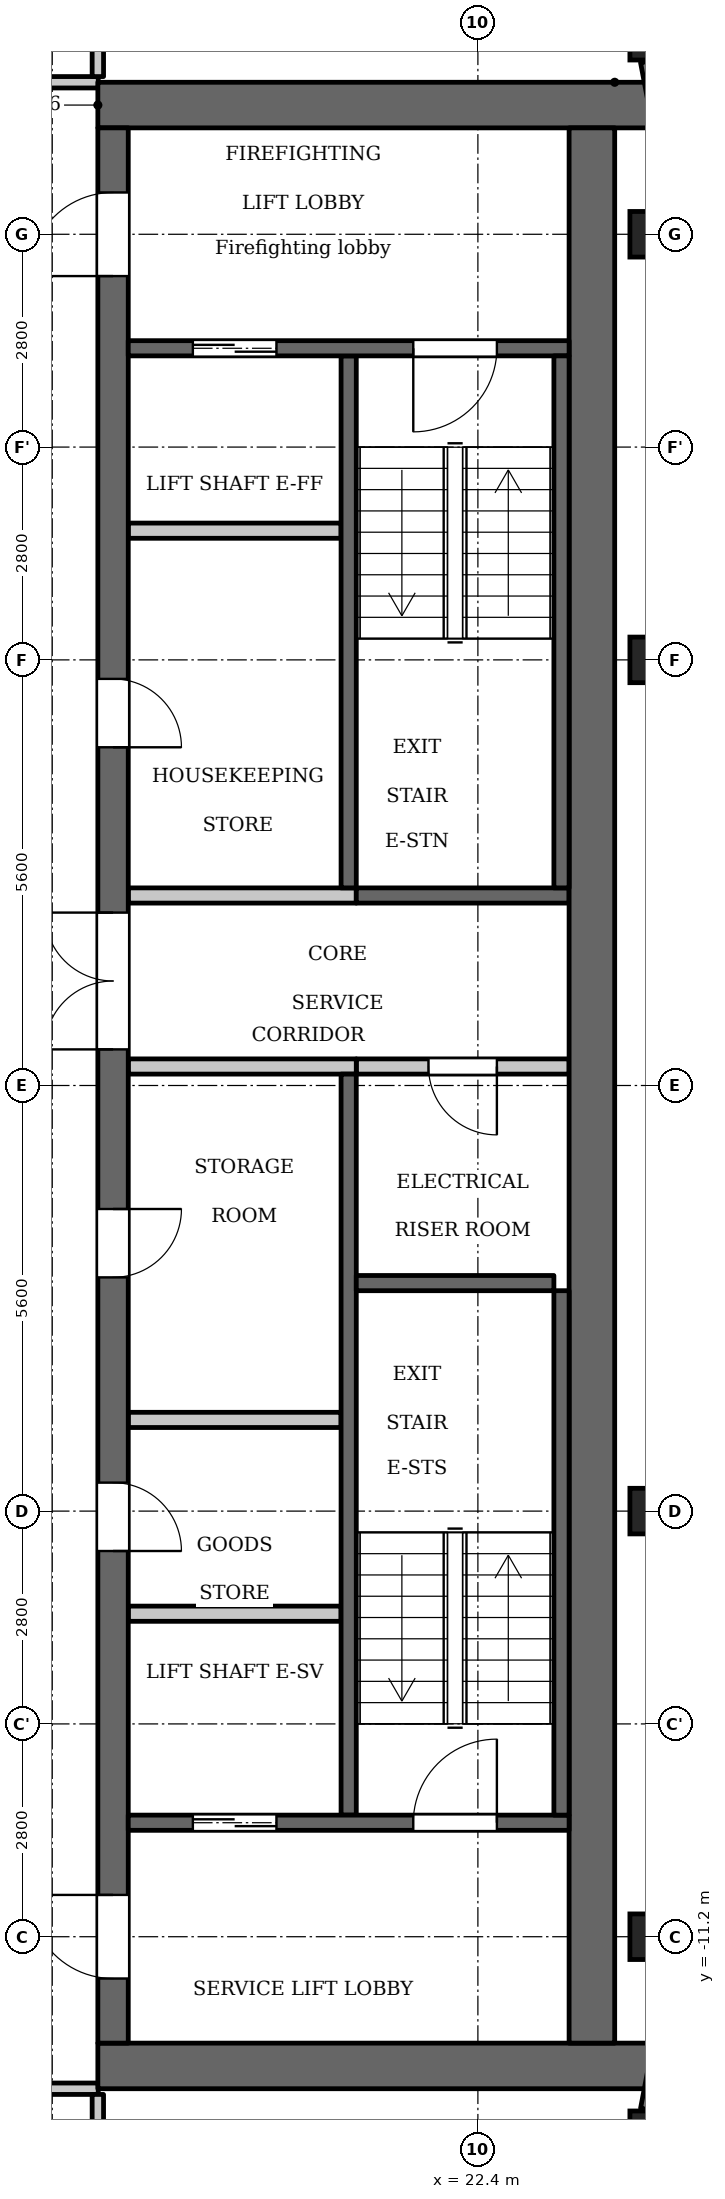
"""IFC4 building model, lengths in metres.
Left out: names, types, materials, properties, quantities, classifications, styles, units other than length and angle.
Written with IfcOpenShell. Run it as: python <this file> out.ifc"""

import sys

from ifc_helpers import new_model, si_unit, direction, frame, frame_2d, origin, origin_2d, place, context, subcontext, project, spatial, rectangle, extrude, element, fill, save


model = new_model("IFC4")
c1 = context("Model", 3, precision=1e-05, world=origin(), true_north=direction((0.0, 1.0)))
c2 = subcontext(c1, "Body", "Model", "MODEL_VIEW")
j1 = project(units=[si_unit("LENGTHUNIT", "METRE"), si_unit("PLANEANGLEUNIT", "RADIAN")], contexts=[c1])
p1 = place(None, origin())
s1 = spatial("IfcSite", under=j1, at=p1, CompositionType="ELEMENT")
p2 = place(p1, origin())
s2 = spatial("IfcBuilding", under=s1, at=p2, CompositionType="ELEMENT")
p3 = place(p2, frame((0.0, 0.0, 310.4)))
s3 = spatial("IfcBuildingStorey", under=s2, at=p3, CompositionType="ELEMENT", Elevation=310.4)
for number, where, z_axis, x_axis in (
    (1, (24.7, -13.793, 0.0), (0.0, 0.0, 1.0), (1.0, 0.0, 0.0)),
    (2, (24.7, -11.2, 0.0), (0.0, 0.0, 1.0), (1.0, 0.0, 0.0)),
    (3, (24.7, -5.6, 0.0), (0.0, 0.0, 1.0), (1.0, 0.0, 0.0)),
    (4, (24.7, 5.6, 0.0), (0.0, 0.0, 1.0), (1.0, 0.0, 0.0)),
    (5, (24.7, 11.2, 0.0), (0.0, 0.0, 1.0), (1.0, 0.0, 0.0)),
    (6, (24.7, 13.793, 0.0), (0.0, 0.0, 1.0), (1.0, 0.0, 0.0)),
):
    element("IfcColumn", number, at=place(p3, frame(where, z_axis=z_axis, x_axis=x_axis)), inside=s3, PredefinedType="COLUMN", context=c2, shape_type="SweptSolid", body=[
        extrude(rectangle(XDim=0.6, YDim=0.6, at=origin_2d()), origin(), (0.0, 0.0, 1.0), 3.5),
    ])
for number, where, z_axis, x_axis in (
    (7, (24.688, -13.485, 0.0), (0.0, 0.0, 1.0), (0.187, 0.982, 0.0)),
    (8, (25.052, 11.573, 0.0), (0.0, 0.0, 1.0), (-0.187, 0.982, 0.0)),
):
    element("IfcWall", number, at=place(p3, frame(where, z_axis=z_axis, x_axis=x_axis)), inside=s3, PredefinedType="SOLIDWALL", context=c2, shape_type="SweptSolid", body=[
        extrude(rectangle(XDim=1.947, YDim=0.3, at=frame_2d((0.973, 0.0))), origin(), (0.0, 0.0, 1.0), 2.2),
    ])
p4 = place(p3, frame((20.7, 2.6, 0.0), z_axis=(0.0, 0.0, 1.0), x_axis=(0.0, 1.0, 0.0)))
e9 = element("IfcWall", 9, at=p4, inside=s3, PredefinedType="SHEAR", context=c2, shape_type="SweptSolid", body=[
    extrude(rectangle(XDim=7.0, YDim=0.2, at=frame_2d((3.5, 0.0))), origin(), (0.0, 0.0, 1.0), 2.8),
])
p5 = place(p3, frame((20.7, -9.6, 0.0), z_axis=(0.0, 0.0, 1.0), x_axis=(0.0, 1.0, 0.0)))
e10 = element("IfcWall", 10, at=p5, inside=s3, PredefinedType="SHEAR", context=c2, shape_type="SweptSolid", body=[
    extrude(rectangle(XDim=9.75, YDim=0.2, at=frame_2d((4.875, 0.0))), origin(), (0.0, 0.0, 1.0), 2.8),
])
p6 = place(p3, frame((20.8, 2.5, 0.0), z_axis=(0.0, 0.0, 1.0), x_axis=(1.0, 0.0, 0.0)))
e11 = element("IfcWall", 11, at=p6, inside=s3, PredefinedType="SHEAR", context=c2, shape_type="SweptSolid", body=[
    extrude(rectangle(XDim=2.8, YDim=0.2, at=frame_2d((1.4, 0.0))), origin(), (0.0, 0.0, 1.0), 2.8),
])
p7 = place(p3, frame((20.8, 0.25, 0.0), z_axis=(0.0, 0.0, 1.0), x_axis=(1.0, 0.0, 0.0)))
e12 = element("IfcWall", 12, at=p7, inside=s3, PredefinedType="PARTITIONING", context=c2, shape_type="SweptSolid", body=[
    extrude(rectangle(XDim=2.8, YDim=0.2, at=frame_2d((1.4, 0.0))), origin(), (0.0, 0.0, 1.0), 2.8),
])
p8 = place(p7, frame((0.95, 0.0, 0.0)))
e13 = element("IfcOpeningElement", 13, at=p8, cuts=e12, PredefinedType="OPENING", context=c2, shape_type="SweptSolid", body=[
    extrude(rectangle(XDim=0.9, YDim=2.1, at=frame_2d((0.45, 1.05))), frame((0.0, 0.11, 0.0), z_axis=(0.0, -1.0, 0.0), x_axis=(1.0, 0.0, 0.0)), (0.0, 0.0, 1.0), 0.22),
])
for number, where, z_axis, x_axis in (
    (14, (17.4, 12.9, 0.0), (0.0, 0.0, 1.0), (1.0, 0.0, 0.0)),
    (15, (17.4, -12.9, 0.0), (0.0, 0.0, 1.0), (1.0, 0.0, 0.0)),
):
    element("IfcWall", number, at=place(p3, frame(where, z_axis=z_axis, x_axis=x_axis)), inside=s3, PredefinedType="SHEAR", context=c2, shape_type="SweptSolid", body=[
        extrude(rectangle(XDim=7.6, YDim=0.6, at=frame_2d((3.8, 0.0))), origin(), (0.0, 0.0, 1.0), 2.8),
    ])
p9 = place(p3, frame((17.8, -4.4, 0.0), z_axis=(0.0, 0.0, 1.0), x_axis=(1.0, 0.0, 0.0)))
e16 = element("IfcWall", 16, at=p9, inside=s3, PredefinedType="PARTITIONING", context=c2, shape_type="SweptSolid", body=[
    extrude(rectangle(XDim=2.8, YDim=0.2, at=frame_2d((1.4, 0.0))), origin(), (0.0, 0.0, 1.0), 2.8),
])
p10 = place(p3, frame((17.6, -12.6, 0.0), z_axis=(0.0, 0.0, 1.0), x_axis=(0.0, 1.0, 0.0)))
e17 = element("IfcWall", 17, at=p10, inside=s3, PredefinedType="SHEAR", context=c2, shape_type="SweptSolid", body=[
    extrude(rectangle(XDim=25.2, YDim=0.4, at=frame_2d((12.6, 0.0))), origin(), (0.0, 0.0, 1.0), 2.8),
])
p11 = place(p10, frame((6.475, 0.0, 0.0)))
e18 = element("IfcOpeningElement", 18, at=p11, cuts=e17, PredefinedType="OPENING", context=c2, shape_type="SweptSolid", body=[
    extrude(rectangle(XDim=0.9, YDim=2.1, at=frame_2d((0.45, 1.05))), frame((0.0, 0.21, 0.0), z_axis=(0.0, -1.0, 0.0), x_axis=(1.0, 0.0, 0.0)), (0.0, 0.0, 1.0), 0.42),
])
p12 = place(p10, frame((10.075, 0.0, 0.0)))
e19 = element("IfcOpeningElement", 19, at=p12, cuts=e17, PredefinedType="OPENING", context=c2, shape_type="SweptSolid", body=[
    extrude(rectangle(XDim=0.9, YDim=2.1, at=frame_2d((0.45, 1.05))), frame((0.0, 0.21, 0.0), z_axis=(0.0, -1.0, 0.0), x_axis=(1.0, 0.0, 0.0)), (0.0, 0.0, 1.0), 0.42),
])
p13 = place(p10, frame((17.05, 0.0, 0.0)))
e20 = element("IfcOpeningElement", 20, at=p13, cuts=e17, PredefinedType="OPENING", context=c2, shape_type="SweptSolid", body=[
    extrude(rectangle(XDim=0.9, YDim=2.1, at=frame_2d((0.45, 1.05))), frame((0.0, 0.21, 0.0), z_axis=(0.0, -1.0, 0.0), x_axis=(1.0, 0.0, 0.0)), (0.0, 0.0, 1.0), 0.42),
])
p14 = place(p10, frame((23.25, 0.0, 0.0)))
e21 = element("IfcOpeningElement", 21, at=p14, cuts=e17, PredefinedType="OPENING", context=c2, shape_type="SweptSolid", body=[
    extrude(rectangle(XDim=1.1, YDim=2.1, at=frame_2d((0.55, 1.05))), frame((0.0, 0.21, 0.0), z_axis=(0.0, -1.0, 0.0), x_axis=(1.0, 0.0, 0.0)), (0.0, 0.0, 1.0), 0.42),
])
p15 = place(p10, frame((0.85, 0.0, 0.0)))
e22 = element("IfcOpeningElement", 22, at=p15, cuts=e17, PredefinedType="OPENING", context=c2, shape_type="SweptSolid", body=[
    extrude(rectangle(XDim=1.1, YDim=2.1, at=frame_2d((0.55, 1.05))), frame((0.0, 0.21, 0.0), z_axis=(0.0, -1.0, 0.0), x_axis=(1.0, 0.0, 0.0)), (0.0, 0.0, 1.0), 0.42),
])
p16 = place(p10, frame((13.075, 0.0, 0.0)))
e23 = element("IfcOpeningElement", 23, at=p16, cuts=e17, PredefinedType="OPENING", context=c2, shape_type="SweptSolid", body=[
    extrude(rectangle(XDim=1.8, YDim=2.1, at=frame_2d((0.9, 1.05))), frame((0.0, 0.21, 0.0), z_axis=(0.0, -1.0, 0.0), x_axis=(1.0, 0.0, 0.0)), (0.0, 0.0, 1.0), 0.42),
])
p17 = place(p3, frame((23.9, -12.6, 0.0), z_axis=(0.0, 0.0, 1.0), x_axis=(0.0, 1.0, 0.0)))
e24 = element("IfcWall", 24, at=p17, inside=s3, PredefinedType="SHEAR", context=c2, shape_type="SweptSolid", body=[
    extrude(rectangle(XDim=25.2, YDim=0.6, at=frame_2d((12.6, 0.0))), origin(), (0.0, 0.0, 1.0), 2.8),
])
p18 = place(p3, frame((17.8, -9.7, 0.0), z_axis=(0.0, 0.0, 1.0), x_axis=(1.0, 0.0, 0.0)))
e25 = element("IfcWall", 25, at=p18, inside=s3, PredefinedType="SHEAR", context=c2, shape_type="SweptSolid", body=[
    extrude(rectangle(XDim=5.8, YDim=0.2, at=frame_2d((2.9, 0.0))), origin(), (0.0, 0.0, 1.0), 2.8),
])
p19 = place(p18, frame((0.85, 0.0, 0.0)))
e26 = element("IfcOpeningElement", 26, at=p19, cuts=e25, PredefinedType="OPENING", context=c2, shape_type="SweptSolid", body=[
    extrude(rectangle(XDim=1.1, YDim=2.1, at=frame_2d((0.55, 1.05))), frame((0.0, 0.11, 0.0), z_axis=(0.0, -1.0, 0.0), x_axis=(1.0, 0.0, 0.0)), (0.0, 0.0, 1.0), 0.22),
])
p20 = place(p18, frame((3.75, 0.0, 0.0)))
e27 = element("IfcOpeningElement", 27, at=p20, cuts=e25, PredefinedType="OPENING", context=c2, shape_type="SweptSolid", body=[
    extrude(rectangle(XDim=1.1, YDim=2.1, at=frame_2d((0.55, 1.05))), frame((0.0, 0.11, 0.0), z_axis=(0.0, -1.0, 0.0), x_axis=(1.0, 0.0, 0.0)), (0.0, 0.0, 1.0), 0.22),
])
p21 = place(p3, frame((17.8, -6.95, 0.0), z_axis=(0.0, 0.0, 1.0), x_axis=(1.0, 0.0, 0.0)))
e28 = element("IfcWall", 28, at=p21, inside=s3, PredefinedType="PARTITIONING", context=c2, shape_type="SweptSolid", body=[
    extrude(rectangle(XDim=2.8, YDim=0.2, at=frame_2d((1.4, 0.0))), origin(), (0.0, 0.0, 1.0), 2.8),
])
for number, where, z_axis, x_axis in (
    (29, (17.8, 0.25, 0.0), (0.0, 0.0, 1.0), (1.0, 0.0, 0.0)),
    (30, (17.8, 2.5, 0.0), (0.0, 0.0, 1.0), (1.0, 0.0, 0.0)),
):
    element("IfcWall", number, at=place(p3, frame(where, z_axis=z_axis, x_axis=x_axis)), inside=s3, PredefinedType="PARTITIONING", context=c2, shape_type="SweptSolid", body=[
        extrude(rectangle(XDim=3.0, YDim=0.2, at=frame_2d((1.5, 0.0))), origin(), (0.0, 0.0, 1.0), 2.8),
    ])
p22 = place(p3, frame((17.8, 7.3, 0.0), z_axis=(0.0, 0.0, 1.0), x_axis=(1.0, 0.0, 0.0)))
e31 = element("IfcWall", 31, at=p22, inside=s3, PredefinedType="PARTITIONING", context=c2, shape_type="SweptSolid", body=[
    extrude(rectangle(XDim=2.8, YDim=0.2, at=frame_2d((1.4, 0.0))), origin(), (0.0, 0.0, 1.0), 2.8),
])
p23 = place(p3, frame((17.8, 9.7, 0.0), z_axis=(0.0, 0.0, 1.0), x_axis=(1.0, 0.0, 0.0)))
e32 = element("IfcWall", 32, at=p23, inside=s3, PredefinedType="SHEAR", context=c2, shape_type="SweptSolid", body=[
    extrude(rectangle(XDim=5.8, YDim=0.2, at=frame_2d((2.9, 0.0))), origin(), (0.0, 0.0, 1.0), 2.8),
])
p24 = place(p23, frame((0.85, 0.0, 0.0)))
e33 = element("IfcOpeningElement", 33, at=p24, cuts=e32, PredefinedType="OPENING", context=c2, shape_type="SweptSolid", body=[
    extrude(rectangle(XDim=1.1, YDim=2.1, at=frame_2d((0.55, 1.05))), frame((0.0, 0.11, 0.0), z_axis=(0.0, -1.0, 0.0), x_axis=(1.0, 0.0, 0.0)), (0.0, 0.0, 1.0), 0.22),
])
p25 = place(p23, frame((3.75, 0.0, 0.0)))
e34 = element("IfcOpeningElement", 34, at=p25, cuts=e32, PredefinedType="OPENING", context=c2, shape_type="SweptSolid", body=[
    extrude(rectangle(XDim=1.1, YDim=2.1, at=frame_2d((0.55, 1.05))), frame((0.0, 0.11, 0.0), z_axis=(0.0, -1.0, 0.0), x_axis=(1.0, 0.0, 0.0)), (0.0, 0.0, 1.0), 0.22),
])
p26 = place(p3, frame((23.5, 2.6, 0.0), z_axis=(0.0, 0.0, 1.0), x_axis=(0.0, 1.0, 0.0)))
e35 = element("IfcWall", 35, at=p26, inside=s3, PredefinedType="SHEAR", context=c2, shape_type="SweptSolid", body=[
    extrude(rectangle(XDim=7.0, YDim=0.2, at=frame_2d((3.5, 0.0))), origin(), (0.0, 0.0, 1.0), 2.8),
])
p27 = place(p3, frame((23.5, -9.6, 0.0), z_axis=(0.0, 0.0, 1.0), x_axis=(0.0, 1.0, 0.0)))
e36 = element("IfcWall", 36, at=p27, inside=s3, PredefinedType="SHEAR", context=c2, shape_type="SweptSolid", body=[
    extrude(rectangle(XDim=6.9, YDim=0.2, at=frame_2d((3.45, 0.0))), origin(), (0.0, 0.0, 1.0), 2.8),
])
p28 = place(p3, frame((20.8, -2.6, 0.0), z_axis=(0.0, 0.0, 1.0), x_axis=(1.0, 0.0, 0.0)))
e37 = element("IfcWall", 37, at=p28, inside=s3, PredefinedType="SHEAR", context=c2, shape_type="SweptSolid", body=[
    extrude(rectangle(XDim=2.6, YDim=0.2, at=frame_2d((1.3, 0.0))), origin(), (0.0, 0.0, 1.0), 2.8),
])
p29 = place(p3, frame((15.32, -13.2, 0.0), z_axis=(0.0, 0.0, 1.0), x_axis=(1.0, 0.0, 0.0)))
e38 = element("IfcWall", 38, at=p29, inside=s3, PredefinedType="PARTITIONING", context=c2, shape_type="SweptSolid", body=[
    extrude(rectangle(XDim=2.085, YDim=0.15, at=frame_2d((1.042, 0.0))), origin(), (0.0, 0.0, 1.0), 2.8),
])
p30 = place(p29, frame((0.42, 0.0, 0.0)))
e39 = element("IfcOpeningElement", 39, at=p30, cuts=e38, PredefinedType="OPENING", context=c2, shape_type="SweptSolid", body=[
    extrude(rectangle(XDim=1.0, YDim=2.1, at=frame_2d((0.5, 1.05))), frame((0.0, 0.085, 0.0), z_axis=(0.0, -1.0, 0.0), x_axis=(1.0, 0.0, 0.0)), (0.0, 0.0, 1.0), 0.17),
])
p31 = place(p3, frame((15.32, 13.2, 0.0), z_axis=(0.0, 0.0, 1.0), x_axis=(1.0, 0.0, 0.0)))
e40 = element("IfcWall", 40, at=p31, inside=s3, PredefinedType="PARTITIONING", context=c2, shape_type="SweptSolid", body=[
    extrude(rectangle(XDim=2.085, YDim=0.15, at=frame_2d((1.042, 0.0))), origin(), (0.0, 0.0, 1.0), 2.8),
])
p32 = place(p31, frame((0.43, 0.0, 0.0)))
e41 = element("IfcOpeningElement", 41, at=p32, cuts=e40, PredefinedType="OPENING", context=c2, shape_type="SweptSolid", body=[
    extrude(rectangle(XDim=1.0, YDim=2.1, at=frame_2d((0.5, 1.05))), frame((0.0, 0.085, 0.0), z_axis=(0.0, -1.0, 0.0), x_axis=(1.0, 0.0, 0.0)), (0.0, 0.0, 1.0), 0.17),
])
p33 = place(p3, frame((17.4, -19.236, 0.0), z_axis=(0.0, 0.0, 1.0), x_axis=(0.0, 1.0, 0.0)))
e42 = element("IfcWall", 42, at=p33, inside=s3, PredefinedType="PARTITIONING", context=c2, shape_type="SweptSolid", body=[
    extrude(rectangle(XDim=5.961, YDim=0.15, at=frame_2d((2.981, 0.0))), origin(), (0.0, 0.0, 1.0), 2.8),
])
p34 = place(p33, frame((3.917, 0.0, 0.0)))
e43 = element("IfcOpeningElement", 43, at=p34, cuts=e42, PredefinedType="OPENING", context=c2, shape_type="SweptSolid", body=[
    extrude(rectangle(XDim=0.9, YDim=2.1, at=frame_2d((0.45, 1.05))), frame((0.0, 0.085, 0.0), z_axis=(0.0, -1.0, 0.0), x_axis=(1.0, 0.0, 0.0)), (0.0, 0.0, 1.0), 0.17),
])
p35 = place(p3, frame((17.4, 13.275, 0.0), z_axis=(0.0, 0.0, 1.0), x_axis=(0.0, 1.0, 0.0)))
e44 = element("IfcWall", 44, at=p35, inside=s3, PredefinedType="PARTITIONING", context=c2, shape_type="SweptSolid", body=[
    extrude(rectangle(XDim=5.961, YDim=0.15, at=frame_2d((2.981, 0.0))), origin(), (0.0, 0.0, 1.0), 2.8),
])
p36 = place(p35, frame((4.575, 0.0, 0.0)))
e45 = element("IfcOpeningElement", 45, at=p36, cuts=e44, PredefinedType="OPENING", context=c2, shape_type="SweptSolid", body=[
    extrude(rectangle(XDim=1.0, YDim=2.1, at=frame_2d((0.5, 1.05))), frame((0.0, 0.085, 0.0), z_axis=(0.0, -1.0, 0.0), x_axis=(1.0, 0.0, 0.0)), (0.0, 0.0, 1.0), 0.17),
])
p37 = place(p19, origin())
e46 = element("IfcDoor", 46, at=p37, inside=s3, OperationType="DOUBLE_DOOR_SLIDING", PredefinedType="DOOR", context=c2, shape_type="SweptSolid", body=[
    extrude(rectangle(XDim=1.1, YDim=2.1, at=frame_2d((0.55, 1.05))), frame((0.0, 0.025, 0.0), z_axis=(0.0, -1.0, 0.0), x_axis=(1.0, 0.0, 0.0)), (0.0, 0.0, 1.0), 0.05),
])
fill(e26, e46)
p38 = place(p11, origin())
e47 = element("IfcDoor", 47, at=p38, inside=s3, OperationType="SINGLE_SWING_LEFT", PredefinedType="DOOR", context=c2, shape_type="SweptSolid", body=[
    extrude(rectangle(XDim=0.9, YDim=2.1, at=frame_2d((0.45, 1.05))), frame((0.0, 0.025, 0.0), z_axis=(0.0, -1.0, 0.0), x_axis=(1.0, 0.0, 0.0)), (0.0, 0.0, 1.0), 0.05),
])
fill(e18, e47)
p39 = place(p12, origin())
e48 = element("IfcDoor", 48, at=p39, inside=s3, OperationType="SINGLE_SWING_RIGHT", PredefinedType="DOOR", context=c2, shape_type="SweptSolid", body=[
    extrude(rectangle(XDim=0.9, YDim=2.1, at=frame_2d((0.45, 1.05))), frame((0.0, 0.025, 0.0), z_axis=(0.0, -1.0, 0.0), x_axis=(1.0, 0.0, 0.0)), (0.0, 0.0, 1.0), 0.05),
])
fill(e19, e48)
p40 = place(p13, origin())
e49 = element("IfcDoor", 49, at=p40, inside=s3, OperationType="SINGLE_SWING_LEFT", PredefinedType="DOOR", context=c2, shape_type="SweptSolid", body=[
    extrude(rectangle(XDim=0.9, YDim=2.1, at=frame_2d((0.45, 1.05))), frame((0.0, 0.025, 0.0), z_axis=(0.0, -1.0, 0.0), x_axis=(1.0, 0.0, 0.0)), (0.0, 0.0, 1.0), 0.05),
])
fill(e20, e49)
p41 = place(p24, origin())
e50 = element("IfcDoor", 50, at=p41, inside=s3, OperationType="DOUBLE_DOOR_SLIDING", PredefinedType="DOOR", context=c2, shape_type="SweptSolid", body=[
    extrude(rectangle(XDim=1.1, YDim=2.1, at=frame_2d((0.55, 1.05))), frame((0.0, 0.025, 0.0), z_axis=(0.0, -1.0, 0.0), x_axis=(1.0, 0.0, 0.0)), (0.0, 0.0, 1.0), 0.05),
])
fill(e33, e50)
p42 = place(p14, origin())
e51 = element("IfcDoor", 51, at=p42, inside=s3, OperationType="SINGLE_SWING_RIGHT", PredefinedType="DOOR", context=c2, shape_type="SweptSolid", body=[
    extrude(rectangle(XDim=1.1, YDim=2.1, at=frame_2d((0.55, 1.05))), frame((0.0, 0.025, 0.0), z_axis=(0.0, -1.0, 0.0), x_axis=(1.0, 0.0, 0.0)), (0.0, 0.0, 1.0), 0.05),
])
fill(e21, e51)
p43 = place(p15, origin())
e52 = element("IfcDoor", 52, at=p43, inside=s3, OperationType="SINGLE_SWING_LEFT", PredefinedType="DOOR", context=c2, shape_type="SweptSolid", body=[
    extrude(rectangle(XDim=1.1, YDim=2.1, at=frame_2d((0.55, 1.05))), frame((0.0, 0.025, 0.0), z_axis=(0.0, -1.0, 0.0), x_axis=(1.0, 0.0, 0.0)), (0.0, 0.0, 1.0), 0.05),
])
fill(e22, e52)
p44 = place(p25, origin())
e53 = element("IfcDoor", 53, at=p44, inside=s3, OperationType="SINGLE_SWING_LEFT", PredefinedType="DOOR", context=c2, shape_type="SweptSolid", body=[
    extrude(rectangle(XDim=1.1, YDim=2.1, at=frame_2d((0.55, 1.05))), frame((0.0, 0.025, 0.0), z_axis=(0.0, -1.0, 0.0), x_axis=(1.0, 0.0, 0.0)), (0.0, 0.0, 1.0), 0.05),
])
fill(e34, e53)
p45 = place(p20, origin())
e54 = element("IfcDoor", 54, at=p45, inside=s3, OperationType="SINGLE_SWING_LEFT", PredefinedType="DOOR", context=c2, shape_type="SweptSolid", body=[
    extrude(rectangle(XDim=1.1, YDim=2.1, at=frame_2d((0.55, 1.05))), frame((0.0, 0.025, 0.0), z_axis=(0.0, -1.0, 0.0), x_axis=(1.0, 0.0, 0.0)), (0.0, 0.0, 1.0), 0.05),
])
fill(e27, e54)
p46 = place(p16, origin())
e55 = element("IfcDoor", 55, at=p46, inside=s3, OperationType="DOUBLE_DOOR_SINGLE_SWING", PredefinedType="DOOR", context=c2, shape_type="SweptSolid", body=[
    extrude(rectangle(XDim=1.8, YDim=2.1, at=frame_2d((0.9, 1.05))), frame((0.0, 0.025, 0.0), z_axis=(0.0, -1.0, 0.0), x_axis=(1.0, 0.0, 0.0)), (0.0, 0.0, 1.0), 0.05),
])
fill(e23, e55)
p47 = place(p8, origin())
e56 = element("IfcDoor", 56, at=p47, inside=s3, OperationType="SINGLE_SWING_RIGHT", PredefinedType="DOOR", context=c2, shape_type="SweptSolid", body=[
    extrude(rectangle(XDim=0.9, YDim=2.1, at=frame_2d((0.45, 1.05))), frame((0.0, 0.025, 0.0), z_axis=(0.0, -1.0, 0.0), x_axis=(1.0, 0.0, 0.0)), (0.0, 0.0, 1.0), 0.05),
])
fill(e13, e56)
save(model, sys.argv[1])
